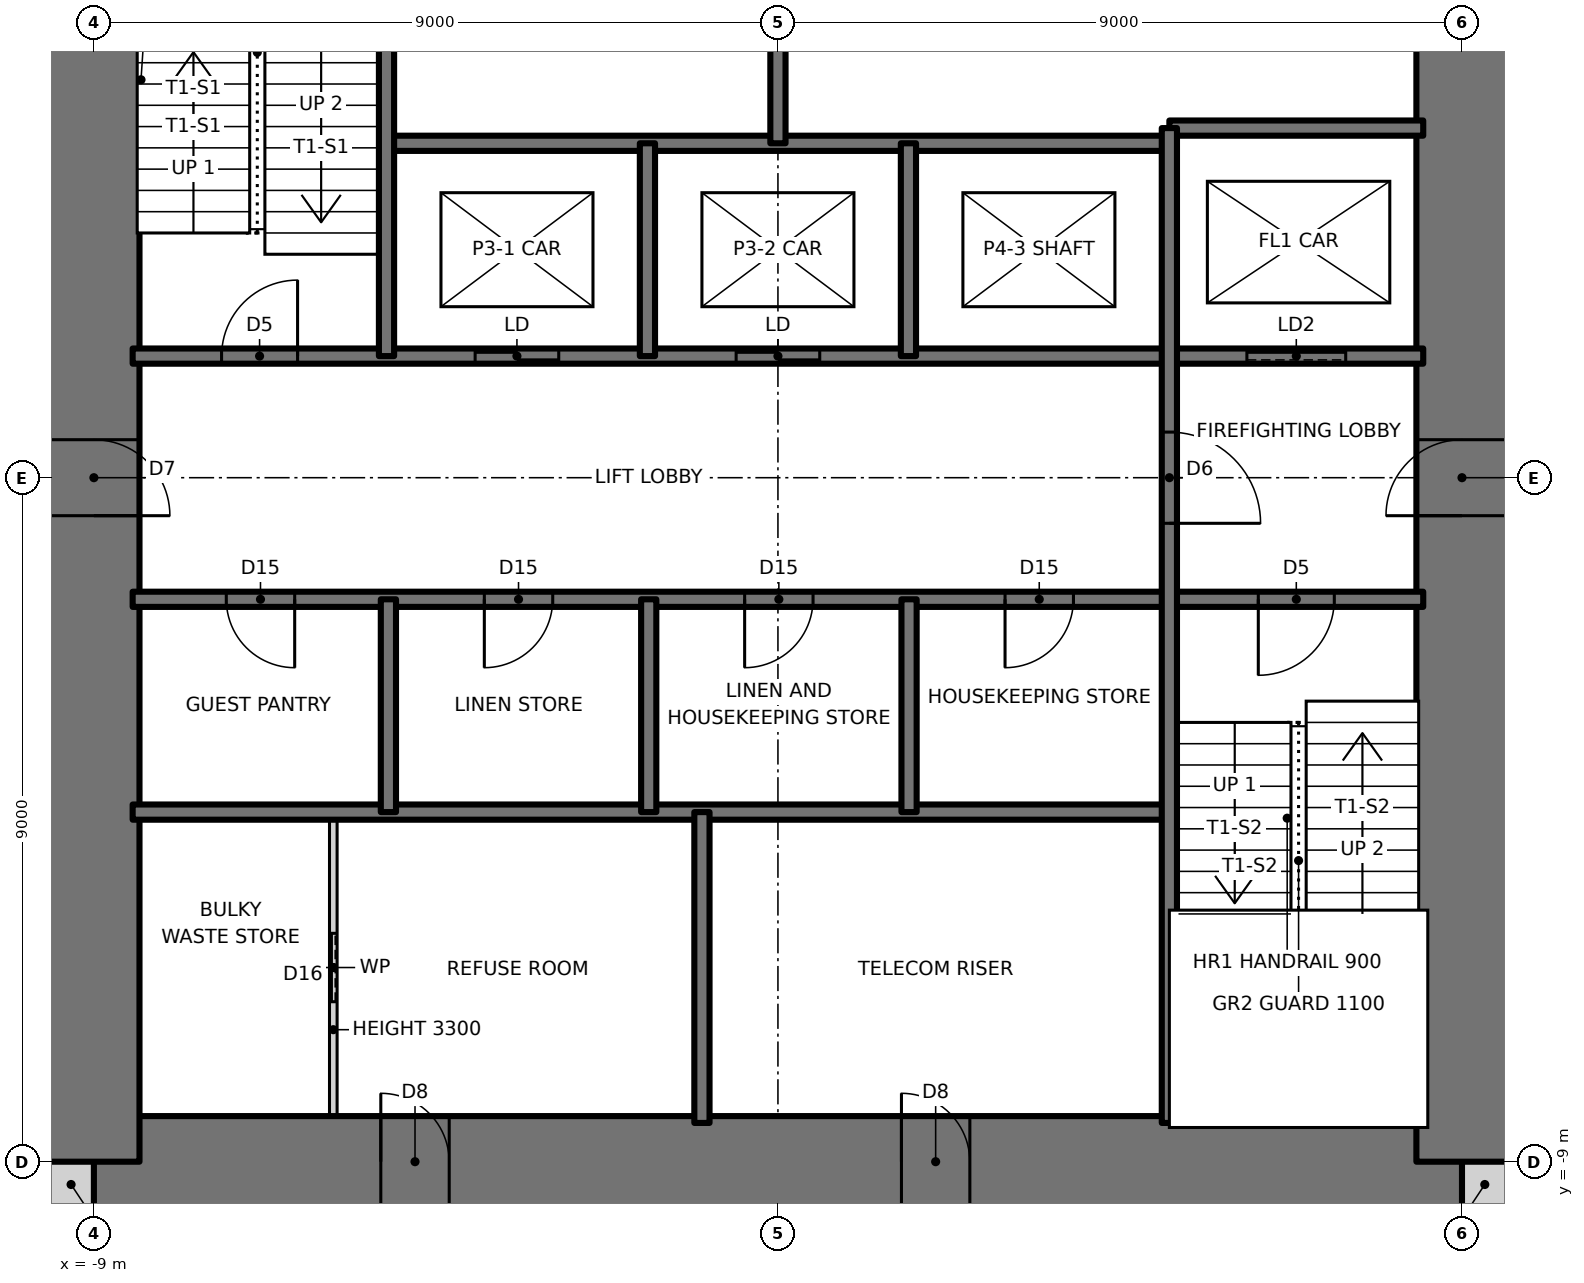
"""IFC4 building model, lengths in metres.
Left out: names, types, materials, properties, quantities, classifications, styles, units other than length and angle.
Written with IfcOpenShell. Run it as: python <this file> out.ifc"""

import sys

from ifc_helpers import new_model, si_unit, direction, frame, frame_2d, origin, place, context, subcontext, project, spatial, rectangle, extrude, element, fill, save


model = new_model("IFC4")
c1 = context("Model", 3, precision=1e-05, world=origin(), true_north=direction((0.0, 1.0)))
c2 = subcontext(c1, "Body", "Model", "MODEL_VIEW")
j1 = project(units=[si_unit("LENGTHUNIT", "METRE"), si_unit("PLANEANGLEUNIT", "RADIAN")], contexts=[c1])
p1 = place(None, origin())
s1 = spatial("IfcSite", under=j1, at=p1, CompositionType="ELEMENT")
p2 = place(p1, origin())
s2 = spatial("IfcBuilding", under=s1, at=p2, CompositionType="ELEMENT")
p3 = place(p2, frame((0.0, 0.0, 188.0)))
s3 = spatial("IfcBuildingStorey", under=s2, at=p3, CompositionType="ELEMENT", Elevation=188.0)
for number, where, z_axis, x_axis in (
    (1, (-9.6, -9.3, 0.0), (0.0, 0.0, 1.0), (1.0, 0.0, 0.0)),
    (2, (9.0, -9.3, 0.0), (0.0, 0.0, 1.0), (1.0, 0.0, 0.0)),
):
    element("IfcWall", number, at=place(p3, frame(where, z_axis=z_axis, x_axis=x_axis)), inside=s3, PredefinedType="SOLIDWALL", context=c2, shape_type="SweptSolid", body=[
        extrude(rectangle(XDim=0.6, YDim=0.6, at=frame_2d((0.3, 0.0))), origin(), (0.0, 0.0, 1.0), 3.5),
    ])
p4 = place(p3, frame((-9.0, -9.0, 0.0), z_axis=(0.0, 0.0, 1.0), x_axis=(1.0, 0.0, 0.0)))
e3 = element("IfcWall", 3, at=p4, inside=s3, PredefinedType="SHEAR", context=c2, shape_type="SweptSolid", body=[
    extrude(rectangle(XDim=18.0, YDim=1.2, at=frame_2d((9.0, 0.0))), origin(), (0.0, 0.0, 1.0), 3.5),
])
p5 = place(p4, frame((3.775, 0.0, 0.0)))
e4 = element("IfcOpeningElement", 4, at=p5, cuts=e3, PredefinedType="OPENING", context=c2, shape_type="SweptSolid", body=[
    extrude(rectangle(XDim=0.9, YDim=2.1, at=frame_2d((0.45, 1.05))), frame((0.0, 0.61, 0.0), z_axis=(0.0, -1.0, 0.0), x_axis=(1.0, 0.0, 0.0)), (0.0, 0.0, 1.0), 1.22),
])
p6 = place(p4, frame((10.625, 0.0, 0.0)))
e5 = element("IfcOpeningElement", 5, at=p6, cuts=e3, PredefinedType="OPENING", context=c2, shape_type="SweptSolid", body=[
    extrude(rectangle(XDim=0.9, YDim=2.1, at=frame_2d((0.45, 1.05))), frame((0.0, 0.61, 0.0), z_axis=(0.0, -1.0, 0.0), x_axis=(1.0, 0.0, 0.0)), (0.0, 0.0, 1.0), 1.22),
])
p7 = place(p3, frame((9.0, -9.0, 0.0), z_axis=(0.0, 0.0, 1.0), x_axis=(0.0, 1.0, 0.0)))
e6 = element("IfcWall", 6, at=p7, inside=s3, PredefinedType="SHEAR", context=c2, shape_type="SweptSolid", body=[
    extrude(rectangle(XDim=18.0, YDim=1.2, at=frame_2d((9.0, 0.0))), origin(), (0.0, 0.0, 1.0), 3.5),
])
p8 = place(p7, frame((8.5, 0.0, 0.0)))
e7 = element("IfcOpeningElement", 7, at=p8, cuts=e6, PredefinedType="OPENING", context=c2, shape_type="SweptSolid", body=[
    extrude(rectangle(XDim=1.0, YDim=2.1, at=frame_2d((0.5, 1.05))), frame((0.0, 0.61, 0.0), z_axis=(0.0, -1.0, 0.0), x_axis=(1.0, 0.0, 0.0)), (0.0, 0.0, 1.0), 1.22),
])
p9 = place(p3, frame((-9.0, 9.0, 0.0), z_axis=(0.0, 0.0, 1.0), x_axis=(0.0, -1.0, 0.0)))
e8 = element("IfcWall", 8, at=p9, inside=s3, PredefinedType="SHEAR", context=c2, shape_type="SweptSolid", body=[
    extrude(rectangle(XDim=18.0, YDim=1.2, at=frame_2d((9.0, 0.0))), origin(), (0.0, 0.0, 1.0), 3.5),
])
p10 = place(p9, frame((8.5, 0.0, 0.0)))
e9 = element("IfcOpeningElement", 9, at=p10, cuts=e8, PredefinedType="OPENING", context=c2, shape_type="SweptSolid", body=[
    extrude(rectangle(XDim=1.0, YDim=2.1, at=frame_2d((0.5, 1.05))), frame((0.0, 0.61, 0.0), z_axis=(0.0, -1.0, 0.0), x_axis=(1.0, 0.0, 0.0)), (0.0, 0.0, 1.0), 1.22),
])
p11 = place(p3, frame((-8.49, -4.4, 0.0), z_axis=(0.0, 0.0, 1.0), x_axis=(1.0, 0.0, 0.0)))
e10 = element("IfcWall", 10, at=p11, inside=s3, PredefinedType="SOLIDWALL", context=c2, shape_type="SweptSolid", body=[
    extrude(rectangle(XDim=13.64, YDim=0.2, at=frame_2d((6.82, 0.0))), origin(), (0.0, 0.0, 1.0), 3.5),
])
p12 = place(p3, frame((-8.49, -1.6, 0.0), z_axis=(0.0, 0.0, 1.0), x_axis=(1.0, 0.0, 0.0)))
e11 = element("IfcWall", 11, at=p12, inside=s3, PredefinedType="SOLIDWALL", context=c2, shape_type="SweptSolid", body=[
    extrude(rectangle(XDim=16.98, YDim=0.2, at=frame_2d((8.49, 0.0))), origin(), (0.0, 0.0, 1.0), 3.5),
])
p13 = place(p12, frame((14.81, 0.0, 0.0)))
e12 = element("IfcOpeningElement", 12, at=p13, cuts=e11, PredefinedType="OPENING", context=c2, shape_type="SweptSolid", body=[
    extrude(rectangle(XDim=1.0, YDim=2.1, at=frame_2d((0.5, 1.05))), frame((0.0, 0.11, 0.0), z_axis=(0.0, -1.0, 0.0), x_axis=(1.0, 0.0, 0.0)), (0.0, 0.0, 1.0), 0.22),
])
p14 = place(p12, frame((1.232, 0.0, 0.0)))
e13 = element("IfcOpeningElement", 13, at=p14, cuts=e11, PredefinedType="OPENING", context=c2, shape_type="SweptSolid", body=[
    extrude(rectangle(XDim=0.9, YDim=2.1, at=frame_2d((0.45, 1.05))), frame((0.0, 0.11, 0.0), z_axis=(0.0, -1.0, 0.0), x_axis=(1.0, 0.0, 0.0)), (0.0, 0.0, 1.0), 0.22),
])
p15 = place(p12, frame((4.627, 0.0, 0.0)))
e14 = element("IfcOpeningElement", 14, at=p15, cuts=e11, PredefinedType="OPENING", context=c2, shape_type="SweptSolid", body=[
    extrude(rectangle(XDim=0.9, YDim=2.1, at=frame_2d((0.45, 1.05))), frame((0.0, 0.11, 0.0), z_axis=(0.0, -1.0, 0.0), x_axis=(1.0, 0.0, 0.0)), (0.0, 0.0, 1.0), 0.22),
])
p16 = place(p12, frame((8.052, 0.0, 0.0)))
e15 = element("IfcOpeningElement", 15, at=p16, cuts=e11, PredefinedType="OPENING", context=c2, shape_type="SweptSolid", body=[
    extrude(rectangle(XDim=0.9, YDim=2.1, at=frame_2d((0.45, 1.05))), frame((0.0, 0.11, 0.0), z_axis=(0.0, -1.0, 0.0), x_axis=(1.0, 0.0, 0.0)), (0.0, 0.0, 1.0), 0.22),
])
p17 = place(p12, frame((11.478, 0.0, 0.0)))
e16 = element("IfcOpeningElement", 16, at=p17, cuts=e11, PredefinedType="OPENING", context=c2, shape_type="SweptSolid", body=[
    extrude(rectangle(XDim=0.9, YDim=2.1, at=frame_2d((0.45, 1.05))), frame((0.0, 0.11, 0.0), z_axis=(0.0, -1.0, 0.0), x_axis=(1.0, 0.0, 0.0)), (0.0, 0.0, 1.0), 0.22),
])
p18 = place(p3, frame((-8.49, 1.6, 0.0), z_axis=(0.0, 0.0, 1.0), x_axis=(1.0, 0.0, 0.0)))
e17 = element("IfcWall", 17, at=p18, inside=s3, PredefinedType="SOLIDWALL", context=c2, shape_type="SweptSolid", body=[
    extrude(rectangle(XDim=16.98, YDim=0.2, at=frame_2d((8.49, 0.0))), origin(), (0.0, 0.0, 1.0), 3.5),
])
p19 = place(p18, frame((1.17, 0.0, 0.0)))
e18 = element("IfcOpeningElement", 18, at=p19, cuts=e17, PredefinedType="OPENING", context=c2, shape_type="SweptSolid", body=[
    extrude(rectangle(XDim=1.0, YDim=2.1, at=frame_2d((0.5, 1.05))), frame((0.0, 0.11, 0.0), z_axis=(0.0, -1.0, 0.0), x_axis=(1.0, 0.0, 0.0)), (0.0, 0.0, 1.0), 0.22),
])
p20 = place(p18, frame((4.506, 0.0, 0.0)))
e19 = element("IfcOpeningElement", 19, at=p20, cuts=e17, PredefinedType="OPENING", context=c2, shape_type="SweptSolid", body=[
    extrude(rectangle(XDim=1.1, YDim=2.1, at=frame_2d((0.55, 1.05))), frame((0.0, 0.11, 0.0), z_axis=(0.0, -1.0, 0.0), x_axis=(1.0, 0.0, 0.0)), (0.0, 0.0, 1.0), 0.22),
])
p21 = place(p18, frame((7.94, 0.0, 0.0)))
e20 = element("IfcOpeningElement", 20, at=p21, cuts=e17, PredefinedType="OPENING", context=c2, shape_type="SweptSolid", body=[
    extrude(rectangle(XDim=1.1, YDim=2.1, at=frame_2d((0.55, 1.05))), frame((0.0, 0.11, 0.0), z_axis=(0.0, -1.0, 0.0), x_axis=(1.0, 0.0, 0.0)), (0.0, 0.0, 1.0), 0.22),
])
p22 = place(p18, frame((14.66, 0.0, 0.0)))
e21 = element("IfcOpeningElement", 21, at=p22, cuts=e17, PredefinedType="OPENING", context=c2, shape_type="SweptSolid", body=[
    extrude(rectangle(XDim=1.3, YDim=2.1, at=frame_2d((0.65, 1.05))), frame((0.0, 0.11, 0.0), z_axis=(0.0, -1.0, 0.0), x_axis=(1.0, 0.0, 0.0)), (0.0, 0.0, 1.0), 0.22),
])
p23 = place(p3, frame((-5.15, 4.4, 0.0), z_axis=(0.0, 0.0, 1.0), x_axis=(1.0, 0.0, 0.0)))
e22 = element("IfcWall", 22, at=p23, inside=s3, PredefinedType="SOLIDWALL", context=c2, shape_type="SweptSolid", body=[
    extrude(rectangle(XDim=10.3, YDim=0.2, at=frame_2d((5.15, 0.0))), origin(), (0.0, 0.0, 1.0), 3.5),
])
p24 = place(p3, frame((5.15, 4.6, 0.0), z_axis=(0.0, 0.0, 1.0), x_axis=(1.0, 0.0, 0.0)))
e23 = element("IfcWall", 23, at=p24, inside=s3, PredefinedType="SOLIDWALL", context=c2, shape_type="SweptSolid", body=[
    extrude(rectangle(XDim=3.34, YDim=0.2, at=frame_2d((1.67, 0.0))), origin(), (0.0, 0.0, 1.0), 3.5),
])
p25 = place(p3, frame((5.15, -8.49, 0.0), z_axis=(0.0, 0.0, 1.0), x_axis=(0.0, 1.0, 0.0)))
e24 = element("IfcWall", 24, at=p25, inside=s3, PredefinedType="SOLIDWALL", context=c2, shape_type="SweptSolid", body=[
    extrude(rectangle(XDim=13.09, YDim=0.2, at=frame_2d((6.545, 0.0))), origin(), (0.0, 0.0, 1.0), 3.5),
])
p26 = place(p25, frame((7.89, 0.0, 0.0)))
e25 = element("IfcOpeningElement", 25, at=p26, cuts=e24, PredefinedType="OPENING", context=c2, shape_type="SweptSolid", body=[
    extrude(rectangle(XDim=1.2, YDim=2.1, at=frame_2d((0.6, 1.05))), frame((0.0, 0.11, 0.0), z_axis=(0.0, -1.0, 0.0), x_axis=(1.0, 0.0, 0.0)), (0.0, 0.0, 1.0), 0.22),
])
for number, where, z_axis, x_axis in (
    (26, (1.725, -4.4, 0.0), (0.0, 0.0, 1.0), (0.0, 1.0, 0.0)),
    (27, (1.717, 1.6, 0.0), (0.0, 0.0, 1.0), (0.0, 1.0, 0.0)),
):
    element("IfcWall", number, at=place(p3, frame(where, z_axis=z_axis, x_axis=x_axis)), inside=s3, PredefinedType="SOLIDWALL", context=c2, shape_type="SweptSolid", body=[
        extrude(rectangle(XDim=2.8, YDim=0.2, at=frame_2d((1.4, 0.0))), origin(), (0.0, 0.0, 1.0), 3.5),
    ])
for number, where, z_axis, x_axis in (
    (28, (0.0, 4.4, 0.0), (0.0, 0.0, 1.0), (0.0, 1.0, 0.0)),
    (29, (-1.0, -8.49, 0.0), (0.0, 0.0, 1.0), (0.0, 1.0, 0.0)),
):
    element("IfcWall", number, at=place(p3, frame(where, z_axis=z_axis, x_axis=x_axis)), inside=s3, PredefinedType="SOLIDWALL", context=c2, shape_type="SweptSolid", body=[
        extrude(rectangle(XDim=4.09, YDim=0.2, at=frame_2d((2.045, 0.0))), origin(), (0.0, 0.0, 1.0), 3.5),
    ])
for number, where, z_axis, x_axis in (
    (30, (-1.7, -4.4, 0.0), (0.0, 0.0, 1.0), (0.0, 1.0, 0.0)),
    (31, (-1.717, 1.6, 0.0), (0.0, 0.0, 1.0), (0.0, 1.0, 0.0)),
    (32, (-5.125, -4.4, 0.0), (0.0, 0.0, 1.0), (0.0, 1.0, 0.0)),
):
    element("IfcWall", number, at=place(p3, frame(where, z_axis=z_axis, x_axis=x_axis)), inside=s3, PredefinedType="SOLIDWALL", context=c2, shape_type="SweptSolid", body=[
        extrude(rectangle(XDim=2.8, YDim=0.2, at=frame_2d((1.4, 0.0))), origin(), (0.0, 0.0, 1.0), 3.5),
    ])
p27 = place(p3, frame((-5.15, 1.6, 0.0), z_axis=(0.0, 0.0, 1.0), x_axis=(0.0, 1.0, 0.0)))
e33 = element("IfcWall", 33, at=p27, inside=s3, PredefinedType="SOLIDWALL", context=c2, shape_type="SweptSolid", body=[
    extrude(rectangle(XDim=6.89, YDim=0.2, at=frame_2d((3.445, 0.0))), origin(), (0.0, 0.0, 1.0), 3.5),
])
p28 = place(p3, frame((-5.85, -8.49, 0.0), z_axis=(0.0, 0.0, 1.0), x_axis=(0.0, 1.0, 0.0)))
e34 = element("IfcWall", 34, at=p28, inside=s3, PredefinedType="PARTITIONING", context=c2, shape_type="SweptSolid", body=[
    extrude(rectangle(XDim=4.09, YDim=0.1, at=frame_2d((2.045, 0.0))), origin(), (0.0, 0.0, 1.0), 3.3),
])
p29 = place(p28, frame((1.595, 0.0, 0.0)))
e35 = element("IfcOpeningElement", 35, at=p29, cuts=e34, PredefinedType="OPENING", context=c2, shape_type="SweptSolid", body=[
    extrude(rectangle(XDim=0.9, YDim=2.1, at=frame_2d((0.45, 1.05))), frame((0.0, 0.06, 0.0), z_axis=(0.0, -1.0, 0.0), x_axis=(1.0, 0.0, 0.0)), (0.0, 0.0, 1.0), 0.12),
])
p30 = place(p19, origin())
e36 = element("IfcDoor", 36, at=p30, inside=s3, OperationType="SINGLE_SWING_RIGHT", PredefinedType="DOOR", context=c2, shape_type="SweptSolid", body=[
    extrude(rectangle(XDim=1.0, YDim=2.1, at=frame_2d((0.5, 1.05))), frame((0.0, 0.025, 0.0), z_axis=(0.0, -1.0, 0.0), x_axis=(1.0, 0.0, 0.0)), (0.0, 0.0, 1.0), 0.05),
])
fill(e18, e36)
p31 = place(p13, frame((1.0, 0.0, 0.0), z_axis=(0.0, 0.0, 1.0), x_axis=(-1.0, 0.0, 0.0)))
e37 = element("IfcDoor", 37, at=p31, inside=s3, OperationType="SINGLE_SWING_RIGHT", PredefinedType="DOOR", context=c2, shape_type="SweptSolid", body=[
    extrude(rectangle(XDim=1.0, YDim=2.1, at=frame_2d((0.5, 1.05))), frame((0.0, 0.025, 0.0), z_axis=(0.0, -1.0, 0.0), x_axis=(1.0, 0.0, 0.0)), (0.0, 0.0, 1.0), 0.05),
])
fill(e12, e37)
p32 = place(p26, frame((1.2, 0.0, 0.0), z_axis=(0.0, 0.0, 1.0), x_axis=(-1.0, 0.0, 0.0)))
e38 = element("IfcDoor", 38, at=p32, inside=s3, OperationType="SINGLE_SWING_RIGHT", PredefinedType="DOOR", context=c2, shape_type="SweptSolid", body=[
    extrude(rectangle(XDim=1.2, YDim=2.1, at=frame_2d((0.6, 1.05))), frame((0.0, 0.025, 0.0), z_axis=(0.0, -1.0, 0.0), x_axis=(1.0, 0.0, 0.0)), (0.0, 0.0, 1.0), 0.05),
])
fill(e25, e38)
p33 = place(p14, frame((0.9, 0.0, 0.0), z_axis=(0.0, 0.0, 1.0), x_axis=(-1.0, 0.0, 0.0)))
e39 = element("IfcDoor", 39, at=p33, inside=s3, OperationType="SINGLE_SWING_LEFT", PredefinedType="DOOR", context=c2, shape_type="SweptSolid", body=[
    extrude(rectangle(XDim=0.9, YDim=2.1, at=frame_2d((0.45, 1.05))), frame((0.0, 0.025, 0.0), z_axis=(0.0, -1.0, 0.0), x_axis=(1.0, 0.0, 0.0)), (0.0, 0.0, 1.0), 0.05),
])
fill(e13, e39)
p34 = place(p15, frame((0.9, 0.0, 0.0), z_axis=(0.0, 0.0, 1.0), x_axis=(-1.0, 0.0, 0.0)))
e40 = element("IfcDoor", 40, at=p34, inside=s3, OperationType="SINGLE_SWING_RIGHT", PredefinedType="DOOR", context=c2, shape_type="SweptSolid", body=[
    extrude(rectangle(XDim=0.9, YDim=2.1, at=frame_2d((0.45, 1.05))), frame((0.0, 0.025, 0.0), z_axis=(0.0, -1.0, 0.0), x_axis=(1.0, 0.0, 0.0)), (0.0, 0.0, 1.0), 0.05),
])
fill(e14, e40)
p35 = place(p16, frame((0.9, 0.0, 0.0), z_axis=(0.0, 0.0, 1.0), x_axis=(-1.0, 0.0, 0.0)))
e41 = element("IfcDoor", 41, at=p35, inside=s3, OperationType="SINGLE_SWING_RIGHT", PredefinedType="DOOR", context=c2, shape_type="SweptSolid", body=[
    extrude(rectangle(XDim=0.9, YDim=2.1, at=frame_2d((0.45, 1.05))), frame((0.0, 0.025, 0.0), z_axis=(0.0, -1.0, 0.0), x_axis=(1.0, 0.0, 0.0)), (0.0, 0.0, 1.0), 0.05),
])
fill(e15, e41)
p36 = place(p17, frame((0.9, 0.0, 0.0), z_axis=(0.0, 0.0, 1.0), x_axis=(-1.0, 0.0, 0.0)))
e42 = element("IfcDoor", 42, at=p36, inside=s3, OperationType="SINGLE_SWING_RIGHT", PredefinedType="DOOR", context=c2, shape_type="SweptSolid", body=[
    extrude(rectangle(XDim=0.9, YDim=2.1, at=frame_2d((0.45, 1.05))), frame((0.0, 0.025, 0.0), z_axis=(0.0, -1.0, 0.0), x_axis=(1.0, 0.0, 0.0)), (0.0, 0.0, 1.0), 0.05),
])
fill(e16, e42)
p37 = place(p29, origin())
e43 = element("IfcDoor", 43, at=p37, inside=s3, OperationType="SLIDING_TO_LEFT", PredefinedType="DOOR", context=c2, shape_type="SweptSolid", body=[
    extrude(rectangle(XDim=0.9, YDim=2.1, at=frame_2d((0.45, 1.05))), frame((0.0, 0.025, 0.0), z_axis=(0.0, -1.0, 0.0), x_axis=(1.0, 0.0, 0.0)), (0.0, 0.0, 1.0), 0.05),
])
fill(e35, e43)
p38 = place(p10, origin())
e44 = element("IfcDoor", 44, at=p38, inside=s3, OperationType="SINGLE_SWING_RIGHT", PredefinedType="DOOR", context=c2, shape_type="SweptSolid", body=[
    extrude(rectangle(XDim=1.0, YDim=2.1, at=frame_2d((0.5, 1.05))), frame((0.0, 0.025, 0.0), z_axis=(0.0, -1.0, 0.0), x_axis=(1.0, 0.0, 0.0)), (0.0, 0.0, 1.0), 0.05),
])
fill(e9, e44)
p39 = place(p8, origin())
e45 = element("IfcDoor", 45, at=p39, inside=s3, OperationType="SINGLE_SWING_LEFT", PredefinedType="DOOR", context=c2, shape_type="SweptSolid", body=[
    extrude(rectangle(XDim=1.0, YDim=2.1, at=frame_2d((0.5, 1.05))), frame((0.0, 0.025, 0.0), z_axis=(0.0, -1.0, 0.0), x_axis=(1.0, 0.0, 0.0)), (0.0, 0.0, 1.0), 0.05),
])
fill(e7, e45)
p40 = place(p5, origin())
e46 = element("IfcDoor", 46, at=p40, inside=s3, OperationType="SINGLE_SWING_LEFT", PredefinedType="DOOR", context=c2, shape_type="SweptSolid", body=[
    extrude(rectangle(XDim=0.9, YDim=2.1, at=frame_2d((0.45, 1.05))), frame((0.0, 0.025, 0.0), z_axis=(0.0, -1.0, 0.0), x_axis=(1.0, 0.0, 0.0)), (0.0, 0.0, 1.0), 0.05),
])
fill(e4, e46)
p41 = place(p6, origin())
e47 = element("IfcDoor", 47, at=p41, inside=s3, OperationType="SINGLE_SWING_LEFT", PredefinedType="DOOR", context=c2, shape_type="SweptSolid", body=[
    extrude(rectangle(XDim=0.9, YDim=2.1, at=frame_2d((0.45, 1.05))), frame((0.0, 0.025, 0.0), z_axis=(0.0, -1.0, 0.0), x_axis=(1.0, 0.0, 0.0)), (0.0, 0.0, 1.0), 0.05),
])
fill(e5, e47)
p42 = place(p20, origin())
e48 = element("IfcDoor", 48, at=p42, inside=s3, OperationType="DOUBLE_DOOR_SLIDING", PredefinedType="DOOR", context=c2, shape_type="SweptSolid", body=[
    extrude(rectangle(XDim=1.1, YDim=2.1, at=frame_2d((0.55, 1.05))), frame((0.0, 0.025, 0.0), z_axis=(0.0, -1.0, 0.0), x_axis=(1.0, 0.0, 0.0)), (0.0, 0.0, 1.0), 0.05),
])
fill(e19, e48)
p43 = place(p21, origin())
e49 = element("IfcDoor", 49, at=p43, inside=s3, OperationType="DOUBLE_DOOR_SLIDING", PredefinedType="DOOR", context=c2, shape_type="SweptSolid", body=[
    extrude(rectangle(XDim=1.1, YDim=2.1, at=frame_2d((0.55, 1.05))), frame((0.0, 0.025, 0.0), z_axis=(0.0, -1.0, 0.0), x_axis=(1.0, 0.0, 0.0)), (0.0, 0.0, 1.0), 0.05),
])
fill(e20, e49)
p44 = place(p22, origin())
e50 = element("IfcDoor", 50, at=p44, inside=s3, OperationType="SLIDING_TO_LEFT", PredefinedType="DOOR", context=c2, shape_type="SweptSolid", body=[
    extrude(rectangle(XDim=1.3, YDim=2.1, at=frame_2d((0.65, 1.05))), frame((0.0, 0.025, 0.0), z_axis=(0.0, -1.0, 0.0), x_axis=(1.0, 0.0, 0.0)), (0.0, 0.0, 1.0), 0.05),
])
fill(e21, e50)
save(model, sys.argv[1])
